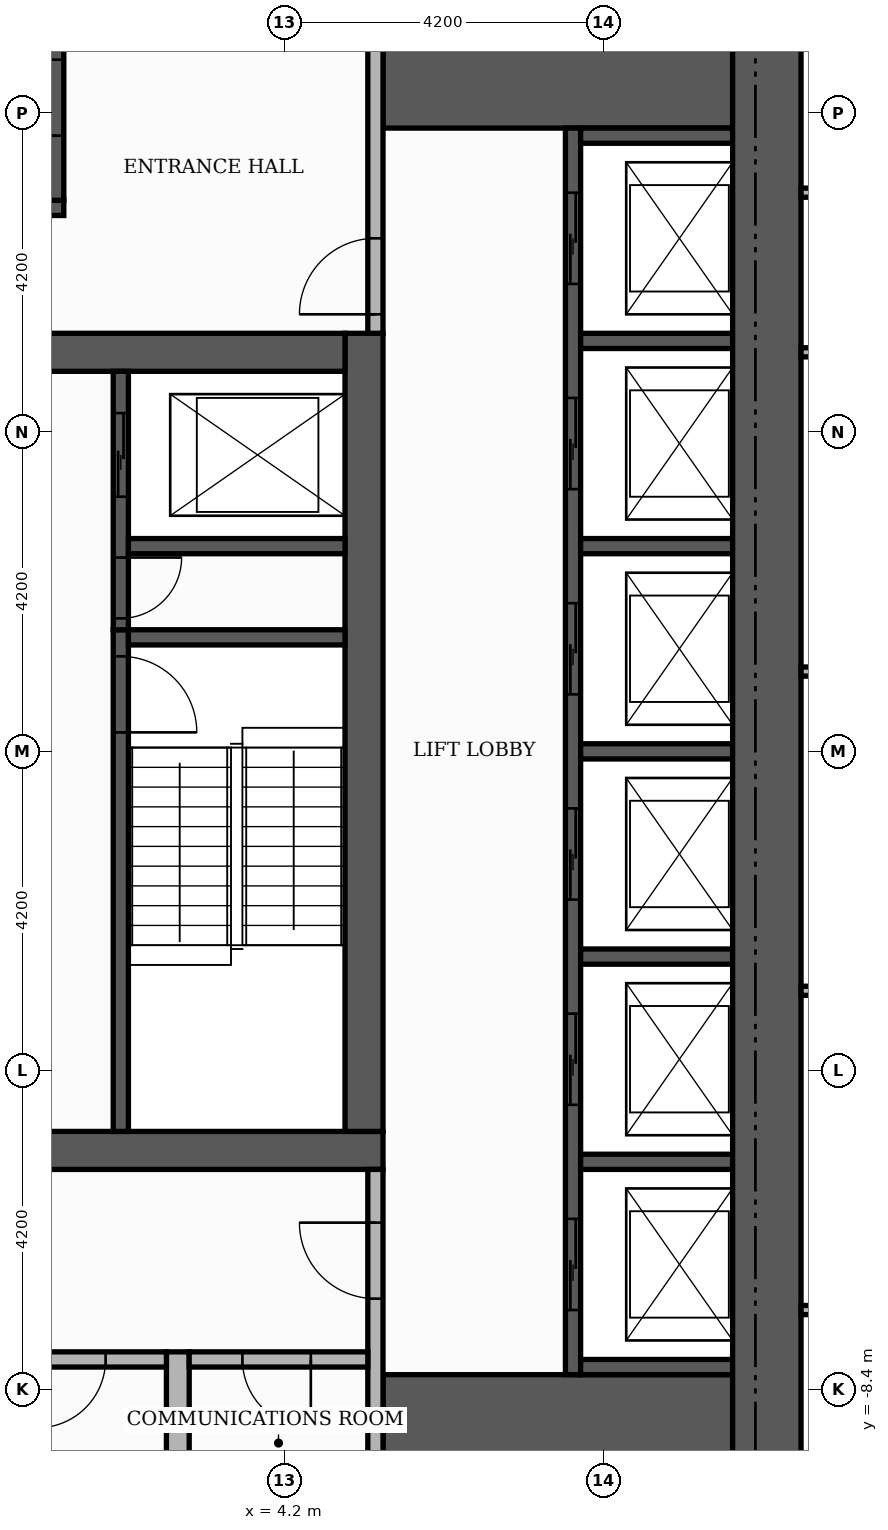
"""IFC4 building model, lengths in metres.
Left out: names, types, materials, properties, quantities, classifications, styles, units other than length and angle.
Written with IfcOpenShell. Run it as: python <this file> out.ifc"""

import sys

from ifc_helpers import new_model, si_unit, direction, frame, frame_2d, origin, place, context, subcontext, project, spatial, rectangle, extrude, element, fill, save


model = new_model("IFC4")
c1 = context("Model", 3, precision=1e-05, world=origin(), true_north=direction((0.0, 1.0)))
c2 = subcontext(c1, "Body", "Model", "MODEL_VIEW")
j1 = project(units=[si_unit("LENGTHUNIT", "METRE"), si_unit("PLANEANGLEUNIT", "RADIAN")], contexts=[c1])
p1 = place(None, origin())
s1 = spatial("IfcSite", under=j1, at=p1, CompositionType="ELEMENT")
p2 = place(p1, origin())
s2 = spatial("IfcBuilding", under=s1, at=p2, CompositionType="ELEMENT")
p3 = place(p2, frame((0.0, 0.0, 227.4)))
s3 = spatial("IfcBuildingStorey", under=s2, at=p3, CompositionType="ELEMENT", Elevation=227.4)
p4 = place(p3, frame((-5.5, -5.25, 0.0), z_axis=(0.0, 0.0, 1.0), x_axis=(1.0, 0.0, 0.0)))
e1 = element("IfcWall", 1, at=p4, inside=s3, PredefinedType="SHEAR", context=c2, shape_type="SweptSolid", body=[
    extrude(rectangle(XDim=11.0, YDim=0.5, at=frame_2d((5.5, 0.0))), origin(), (0.0, 0.0, 1.0), 3.48),
])
p5 = place(p4, frame((4.9, 0.0, 0.0)))
e2 = element("IfcOpeningElement", 2, at=p5, cuts=e1, PredefinedType="OPENING", context=c2, shape_type="SweptSolid", body=[
    extrude(rectangle(XDim=1.2, YDim=2.1, at=frame_2d((0.6, 1.05))), frame((0.0, 0.26, 0.0), z_axis=(0.0, -1.0, 0.0), x_axis=(1.0, 0.0, 0.0)), (0.0, 0.0, 1.0), 0.52),
])
p6 = place(p3, frame((5.25, -5.0, 0.0), z_axis=(0.0, 0.0, 1.0), x_axis=(0.0, 1.0, 0.0)))
e3 = element("IfcWall", 3, at=p6, inside=s3, PredefinedType="SHEAR", context=c2, shape_type="SweptSolid", body=[
    extrude(rectangle(XDim=10.5, YDim=0.5, at=frame_2d((5.25, 0.0))), origin(), (0.0, 0.0, 1.0), 3.48),
])
p7 = place(p3, frame((-5.0, 5.25, 0.0), z_axis=(0.0, 0.0, 1.0), x_axis=(1.0, 0.0, 0.0)))
e4 = element("IfcWall", 4, at=p7, inside=s3, PredefinedType="SHEAR", context=c2, shape_type="SweptSolid", body=[
    extrude(rectangle(XDim=10.0, YDim=0.5, at=frame_2d((5.0, 0.0))), origin(), (0.0, 0.0, 1.0), 3.48),
])
p8 = place(p7, frame((4.4, 0.0, 0.0)))
e5 = element("IfcOpeningElement", 5, at=p8, cuts=e4, PredefinedType="OPENING", context=c2, shape_type="SweptSolid", body=[
    extrude(rectangle(XDim=1.2, YDim=2.1, at=frame_2d((0.6, 1.05))), frame((0.0, 0.26, 0.0), z_axis=(0.0, -1.0, 0.0), x_axis=(1.0, 0.0, 0.0)), (0.0, 0.0, 1.0), 0.52),
])
for number, where, z_axis, x_axis in (
    (6, (5.5, -9.15, 0.0), (0.0, 0.0, 1.0), (1.0, 0.0, 0.0)),
    (7, (5.5, 9.15, 0.0), (0.0, 0.0, 1.0), (1.0, 0.0, 0.0)),
):
    element("IfcWall", number, at=place(p3, frame(where, z_axis=z_axis, x_axis=x_axis)), inside=s3, PredefinedType="SHEAR", context=c2, shape_type="SweptSolid", body=[
        extrude(rectangle(XDim=4.6, YDim=1.9, at=frame_2d((2.3, 0.0))), origin(), (0.0, 0.0, 1.0), 3.48),
    ])
p9 = place(p3, frame((2.05, -5.0, 0.0), z_axis=(0.0, 0.0, 1.0), x_axis=(0.0, 1.0, 0.0)))
e8 = element("IfcWall", 8, at=p9, inside=s3, PredefinedType="SHEAR", context=c2, shape_type="SweptSolid", body=[
    extrude(rectangle(XDim=6.6, YDim=0.2, at=frame_2d((3.3, 0.0))), origin(), (0.0, 0.0, 1.0), 3.48),
])
p10 = place(p9, frame((5.25, 0.0, 0.0)))
e9 = element("IfcOpeningElement", 9, at=p10, cuts=e8, PredefinedType="OPENING", context=c2, shape_type="SweptSolid", body=[
    extrude(rectangle(XDim=1.0, YDim=2.1, at=frame_2d((0.5, 1.05))), frame((0.0, 0.11, 0.0), z_axis=(0.0, -1.0, 0.0), x_axis=(1.0, 0.0, 0.0)), (0.0, 0.0, 1.0), 0.22),
])
p11 = place(p3, frame((2.15, 1.5, 0.0), z_axis=(0.0, 0.0, 1.0), x_axis=(1.0, 0.0, 0.0)))
e10 = element("IfcWall", 10, at=p11, inside=s3, PredefinedType="SHEAR", context=c2, shape_type="SweptSolid", body=[
    extrude(rectangle(XDim=2.85, YDim=0.2, at=frame_2d((1.425, 0.0))), origin(), (0.0, 0.0, 1.0), 3.48),
])
p12 = place(p3, frame((-5.5, 7.15, 0.0), z_axis=(0.0, 0.0, 1.0), x_axis=(1.0, 0.0, 0.0)))
e11 = element("IfcWall", 11, at=p12, inside=s3, PredefinedType="SHEAR", context=c2, shape_type="SweptSolid", body=[
    extrude(rectangle(XDim=6.8, YDim=0.2, at=frame_2d((3.4, 0.0))), origin(), (0.0, 0.0, 1.0), 3.48),
])
p13 = place(p3, frame((1.2, 7.25, 0.0), z_axis=(0.0, 0.0, 1.0), x_axis=(0.0, 1.0, 0.0)))
e12 = element("IfcWall", 12, at=p13, inside=s3, PredefinedType="SHEAR", context=c2, shape_type="SweptSolid", body=[
    extrude(rectangle(XDim=2.85, YDim=0.2, at=frame_2d((1.425, 0.0))), origin(), (0.0, 0.0, 1.0), 3.48),
])
p14 = place(p13, frame((0.85, 0.0, 0.0)))
e13 = element("IfcOpeningElement", 13, at=p14, cuts=e12, PredefinedType="OPENING", context=c2, shape_type="SweptSolid", body=[
    extrude(rectangle(XDim=1.0, YDim=2.1, at=frame_2d((0.5, 1.05))), frame((0.0, 0.11, 0.0), z_axis=(0.0, -1.0, 0.0), x_axis=(1.0, 0.0, 0.0)), (0.0, 0.0, 1.0), 0.22),
])
p15 = place(p3, frame((8.0, -8.2, 0.0), z_axis=(0.0, 0.0, 1.0), x_axis=(0.0, 1.0, 0.0)))
e14 = element("IfcWall", 14, at=p15, inside=s3, PredefinedType="SHEAR", context=c2, shape_type="SweptSolid", body=[
    extrude(rectangle(XDim=16.4, YDim=0.2, at=frame_2d((8.2, 0.0))), origin(), (0.0, 0.0, 1.0), 3.48),
])
p16 = place(p15, frame((0.85, 0.0, 0.0)))
e15 = element("IfcOpeningElement", 15, at=p16, cuts=e14, PredefinedType="OPENING", context=c2, shape_type="SweptSolid", body=[
    extrude(rectangle(XDim=1.2, YDim=2.1, at=frame_2d((0.6, 1.05))), frame((0.0, 0.11, 0.0), z_axis=(0.0, -1.0, 0.0), x_axis=(1.0, 0.0, 0.0)), (0.0, 0.0, 1.0), 0.22),
])
p17 = place(p15, frame((3.55, 0.0, 0.0)))
e16 = element("IfcOpeningElement", 16, at=p17, cuts=e14, PredefinedType="OPENING", context=c2, shape_type="SweptSolid", body=[
    extrude(rectangle(XDim=1.2, YDim=2.1, at=frame_2d((0.6, 1.05))), frame((0.0, 0.11, 0.0), z_axis=(0.0, -1.0, 0.0), x_axis=(1.0, 0.0, 0.0)), (0.0, 0.0, 1.0), 0.22),
])
p18 = place(p15, frame((6.25, 0.0, 0.0)))
e17 = element("IfcOpeningElement", 17, at=p18, cuts=e14, PredefinedType="OPENING", context=c2, shape_type="SweptSolid", body=[
    extrude(rectangle(XDim=1.2, YDim=2.1, at=frame_2d((0.6, 1.05))), frame((0.0, 0.11, 0.0), z_axis=(0.0, -1.0, 0.0), x_axis=(1.0, 0.0, 0.0)), (0.0, 0.0, 1.0), 0.22),
])
p19 = place(p15, frame((8.95, 0.0, 0.0)))
e18 = element("IfcOpeningElement", 18, at=p19, cuts=e14, PredefinedType="OPENING", context=c2, shape_type="SweptSolid", body=[
    extrude(rectangle(XDim=1.2, YDim=2.1, at=frame_2d((0.6, 1.05))), frame((0.0, 0.11, 0.0), z_axis=(0.0, -1.0, 0.0), x_axis=(1.0, 0.0, 0.0)), (0.0, 0.0, 1.0), 0.22),
])
p20 = place(p15, frame((11.65, 0.0, 0.0)))
e19 = element("IfcOpeningElement", 19, at=p20, cuts=e14, PredefinedType="OPENING", context=c2, shape_type="SweptSolid", body=[
    extrude(rectangle(XDim=1.2, YDim=2.1, at=frame_2d((0.6, 1.05))), frame((0.0, 0.11, 0.0), z_axis=(0.0, -1.0, 0.0), x_axis=(1.0, 0.0, 0.0)), (0.0, 0.0, 1.0), 0.22),
])
p21 = place(p15, frame((14.35, 0.0, 0.0)))
e20 = element("IfcOpeningElement", 20, at=p21, cuts=e14, PredefinedType="OPENING", context=c2, shape_type="SweptSolid", body=[
    extrude(rectangle(XDim=1.2, YDim=2.1, at=frame_2d((0.6, 1.05))), frame((0.0, 0.11, 0.0), z_axis=(0.0, -1.0, 0.0), x_axis=(1.0, 0.0, 0.0)), (0.0, 0.0, 1.0), 0.22),
])
for number, where, z_axis, x_axis in (
    (21, (8.1, -8.1, 0.0), (0.0, 0.0, 1.0), (1.0, 0.0, 0.0)),
    (22, (8.1, -5.4, 0.0), (0.0, 0.0, 1.0), (1.0, 0.0, 0.0)),
    (23, (8.1, -2.7, 0.0), (0.0, 0.0, 1.0), (1.0, 0.0, 0.0)),
    (24, (8.1, 0.0, 0.0), (0.0, 0.0, 1.0), (1.0, 0.0, 0.0)),
):
    element("IfcWall", number, at=place(p3, frame(where, z_axis=z_axis, x_axis=x_axis)), inside=s3, PredefinedType="SHEAR", context=c2, shape_type="SweptSolid", body=[
        extrude(rectangle(XDim=2.0, YDim=0.2, at=frame_2d((1.0, 0.0))), origin(), (0.0, 0.0, 1.0), 3.48),
    ])
p22 = place(p3, frame((2.05, 1.6, 0.0), z_axis=(0.0, 0.0, 1.0), x_axis=(0.0, 1.0, 0.0)))
e25 = element("IfcWall", 25, at=p22, inside=s3, PredefinedType="SHEAR", context=c2, shape_type="SweptSolid", body=[
    extrude(rectangle(XDim=3.4, YDim=0.2, at=frame_2d((1.7, 0.0))), origin(), (0.0, 0.0, 1.0), 3.48),
])
p23 = place(p22, frame((1.75, 0.0, 0.0)))
e26 = element("IfcOpeningElement", 26, at=p23, cuts=e25, PredefinedType="OPENING", context=c2, shape_type="SweptSolid", body=[
    extrude(rectangle(XDim=1.1, YDim=2.1, at=frame_2d((0.55, 1.05))), frame((0.0, 0.11, 0.0), z_axis=(0.0, -1.0, 0.0), x_axis=(1.0, 0.0, 0.0)), (0.0, 0.0, 1.0), 0.22),
])
p24 = place(p22, frame((0.15, 0.0, 0.0)))
e27 = element("IfcOpeningElement", 27, at=p24, cuts=e25, PredefinedType="OPENING", context=c2, shape_type="SweptSolid", body=[
    extrude(rectangle(XDim=0.8, YDim=2.1, at=frame_2d((0.4, 1.05))), frame((0.0, 0.11, 0.0), z_axis=(0.0, -1.0, 0.0), x_axis=(1.0, 0.0, 0.0)), (0.0, 0.0, 1.0), 0.22),
])
p25 = place(p3, frame((2.15, 2.7, 0.0), z_axis=(0.0, 0.0, 1.0), x_axis=(1.0, 0.0, 0.0)))
e28 = element("IfcWall", 28, at=p25, inside=s3, PredefinedType="SHEAR", context=c2, shape_type="SweptSolid", body=[
    extrude(rectangle(XDim=2.85, YDim=0.2, at=frame_2d((1.425, 0.0))), origin(), (0.0, 0.0, 1.0), 3.48),
])
for number, where, z_axis, x_axis in (
    (29, (8.1, 2.7, 0.0), (0.0, 0.0, 1.0), (1.0, 0.0, 0.0)),
    (30, (8.1, 5.4, 0.0), (0.0, 0.0, 1.0), (1.0, 0.0, 0.0)),
    (31, (8.1, 8.1, 0.0), (0.0, 0.0, 1.0), (1.0, 0.0, 0.0)),
):
    element("IfcWall", number, at=place(p3, frame(where, z_axis=z_axis, x_axis=x_axis)), inside=s3, PredefinedType="SHEAR", context=c2, shape_type="SweptSolid", body=[
        extrude(rectangle(XDim=2.0, YDim=0.2, at=frame_2d((1.0, 0.0))), origin(), (0.0, 0.0, 1.0), 3.48),
    ])
p26 = place(p3, frame((10.55, -10.1, 0.0), z_axis=(0.0, 0.0, 1.0), x_axis=(0.0, 1.0, 0.0)))
e32 = element("IfcWall", 32, at=p26, inside=s3, PredefinedType="SHEAR", context=c2, shape_type="SweptSolid", body=[
    extrude(rectangle(XDim=20.2, YDim=0.9, at=frame_2d((10.1, 0.0))), origin(), (0.0, 0.0, 1.0), 3.48),
])
p27 = place(p3, frame((2.8, -10.1, 0.0), z_axis=(0.0, 0.0, 1.0), x_axis=(0.0, 1.0, 0.0)))
e33 = element("IfcWall", 33, at=p27, inside=s3, PredefinedType="PARTITIONING", context=c2, shape_type="SweptSolid", body=[
    extrude(rectangle(XDim=2.2, YDim=0.3, at=frame_2d((1.1, 0.0))), origin(), (0.0, 0.0, 1.0), 3.48),
])
p28 = place(p3, frame((5.4, -10.1, 0.0), z_axis=(0.0, 0.0, 1.0), x_axis=(0.0, 1.0, 0.0)))
e34 = element("IfcWall", 34, at=p28, inside=s3, PredefinedType="PARTITIONING", context=c2, shape_type="SweptSolid", body=[
    extrude(rectangle(XDim=4.6, YDim=0.2, at=frame_2d((2.3, 0.0))), origin(), (0.0, 0.0, 1.0), 3.48),
])
p29 = place(p28, frame((2.9, 0.0, 0.0)))
e35 = element("IfcOpeningElement", 35, at=p29, cuts=e34, PredefinedType="OPENING", context=c2, shape_type="SweptSolid", body=[
    extrude(rectangle(XDim=1.0, YDim=2.1, at=frame_2d((0.5, 1.05))), frame((0.0, 0.11, 0.0), z_axis=(0.0, -1.0, 0.0), x_axis=(1.0, 0.0, 0.0)), (0.0, 0.0, 1.0), 0.22),
])
p30 = place(p3, frame((0.1, -8.0, 0.0), z_axis=(0.0, 0.0, 1.0), x_axis=(1.0, 0.0, 0.0)))
e36 = element("IfcWall", 36, at=p30, inside=s3, PredefinedType="PARTITIONING", context=c2, shape_type="SweptSolid", body=[
    extrude(rectangle(XDim=2.55, YDim=0.2, at=frame_2d((1.275, 0.0))), origin(), (0.0, 0.0, 1.0), 3.48),
])
p31 = place(p30, frame((0.85, 0.0, 0.0)))
e37 = element("IfcOpeningElement", 37, at=p31, cuts=e36, PredefinedType="OPENING", context=c2, shape_type="SweptSolid", body=[
    extrude(rectangle(XDim=0.9, YDim=2.1, at=frame_2d((0.45, 1.05))), frame((0.0, 0.11, 0.0), z_axis=(0.0, -1.0, 0.0), x_axis=(1.0, 0.0, 0.0)), (0.0, 0.0, 1.0), 0.22),
])
p32 = place(p3, frame((2.95, -8.0, 0.0), z_axis=(0.0, 0.0, 1.0), x_axis=(1.0, 0.0, 0.0)))
e38 = element("IfcWall", 38, at=p32, inside=s3, PredefinedType="PARTITIONING", context=c2, shape_type="SweptSolid", body=[
    extrude(rectangle(XDim=2.35, YDim=0.2, at=frame_2d((1.175, 0.0))), origin(), (0.0, 0.0, 1.0), 3.48),
])
p33 = place(p32, frame((0.7, 0.0, 0.0)))
e39 = element("IfcOpeningElement", 39, at=p33, cuts=e38, PredefinedType="OPENING", context=c2, shape_type="SweptSolid", body=[
    extrude(rectangle(XDim=0.9, YDim=2.1, at=frame_2d((0.45, 1.05))), frame((0.0, 0.11, 0.0), z_axis=(0.0, -1.0, 0.0), x_axis=(1.0, 0.0, 0.0)), (0.0, 0.0, 1.0), 0.22),
])
p34 = place(p3, frame((5.4, 5.5, 0.0), z_axis=(0.0, 0.0, 1.0), x_axis=(0.0, 1.0, 0.0)))
e40 = element("IfcWall", 40, at=p34, inside=s3, PredefinedType="PARTITIONING", context=c2, shape_type="SweptSolid", body=[
    extrude(rectangle(XDim=4.6, YDim=0.2, at=frame_2d((2.3, 0.0))), origin(), (0.0, 0.0, 1.0), 3.48),
])
p35 = place(p34, frame((0.25, 0.0, 0.0)))
e41 = element("IfcOpeningElement", 41, at=p35, cuts=e40, PredefinedType="OPENING", context=c2, shape_type="SweptSolid", body=[
    extrude(rectangle(XDim=1.0, YDim=2.1, at=frame_2d((0.5, 1.05))), frame((0.0, 0.11, 0.0), z_axis=(0.0, -1.0, 0.0), x_axis=(1.0, 0.0, 0.0)), (0.0, 0.0, 1.0), 0.22),
])
p36 = place(p3, frame((11.0, -7.35, 0.0), z_axis=(0.0, 0.0, 1.0), x_axis=(1.0, 0.0, 0.0)))
e42 = element("IfcWall", 42, at=p36, inside=s3, PredefinedType="PARTITIONING", context=c2, shape_type="SweptSolid", body=[
    extrude(rectangle(XDim=7.92, YDim=0.12, at=frame_2d((3.96, 0.0))), origin(), (0.0, 0.0, 1.0), 3.48),
])
p37 = place(p36, frame((3.51, 0.0, 0.0)))
e43 = element("IfcOpeningElement", 43, at=p37, cuts=e42, PredefinedType="OPENING", context=c2, shape_type="SweptSolid", body=[
    extrude(rectangle(XDim=0.9, YDim=2.1, at=frame_2d((0.45, 1.05))), frame((0.0, 0.07, 0.0), z_axis=(0.0, -1.0, 0.0), x_axis=(1.0, 0.0, 0.0)), (0.0, 0.0, 1.0), 0.14),
])
for number, where, z_axis, x_axis in (
    (44, (11.0, -3.15, 0.0), (0.0, 0.0, 1.0), (1.0, 0.0, 0.0)),
    (45, (11.0, 1.05, 0.0), (0.0, 0.0, 1.0), (1.0, 0.0, 0.0)),
    (46, (11.0, 5.25, 0.0), (0.0, 0.0, 1.0), (1.0, 0.0, 0.0)),
    (47, (11.0, 7.35, 0.0), (0.0, 0.0, 1.0), (1.0, 0.0, 0.0)),
):
    element("IfcWall", number, at=place(p3, frame(where, z_axis=z_axis, x_axis=x_axis)), inside=s3, PredefinedType="PARTITIONING", context=c2, shape_type="SweptSolid", body=[
        extrude(rectangle(XDim=7.92, YDim=0.12, at=frame_2d((3.96, 0.0))), origin(), (0.0, 0.0, 1.0), 3.48),
    ])
p38 = place(p16, origin())
e48 = element("IfcDoor", 48, at=p38, inside=s3, OperationType="SLIDING_TO_LEFT", PredefinedType="DOOR", context=c2, shape_type="SweptSolid", body=[
    extrude(rectangle(XDim=1.2, YDim=2.1, at=frame_2d((0.6, 1.05))), frame((0.0, 0.025, 0.0), z_axis=(0.0, -1.0, 0.0), x_axis=(1.0, 0.0, 0.0)), (0.0, 0.0, 1.0), 0.05),
])
fill(e15, e48)
p39 = place(p17, origin())
e49 = element("IfcDoor", 49, at=p39, inside=s3, OperationType="SLIDING_TO_LEFT", PredefinedType="DOOR", context=c2, shape_type="SweptSolid", body=[
    extrude(rectangle(XDim=1.2, YDim=2.1, at=frame_2d((0.6, 1.05))), frame((0.0, 0.025, 0.0), z_axis=(0.0, -1.0, 0.0), x_axis=(1.0, 0.0, 0.0)), (0.0, 0.0, 1.0), 0.05),
])
fill(e16, e49)
p40 = place(p18, origin())
e50 = element("IfcDoor", 50, at=p40, inside=s3, OperationType="SLIDING_TO_LEFT", PredefinedType="DOOR", context=c2, shape_type="SweptSolid", body=[
    extrude(rectangle(XDim=1.2, YDim=2.1, at=frame_2d((0.6, 1.05))), frame((0.0, 0.025, 0.0), z_axis=(0.0, -1.0, 0.0), x_axis=(1.0, 0.0, 0.0)), (0.0, 0.0, 1.0), 0.05),
])
fill(e17, e50)
p41 = place(p19, origin())
e51 = element("IfcDoor", 51, at=p41, inside=s3, OperationType="SLIDING_TO_LEFT", PredefinedType="DOOR", context=c2, shape_type="SweptSolid", body=[
    extrude(rectangle(XDim=1.2, YDim=2.1, at=frame_2d((0.6, 1.05))), frame((0.0, 0.025, 0.0), z_axis=(0.0, -1.0, 0.0), x_axis=(1.0, 0.0, 0.0)), (0.0, 0.0, 1.0), 0.05),
])
fill(e18, e51)
p42 = place(p20, origin())
e52 = element("IfcDoor", 52, at=p42, inside=s3, OperationType="SLIDING_TO_LEFT", PredefinedType="DOOR", context=c2, shape_type="SweptSolid", body=[
    extrude(rectangle(XDim=1.2, YDim=2.1, at=frame_2d((0.6, 1.05))), frame((0.0, 0.025, 0.0), z_axis=(0.0, -1.0, 0.0), x_axis=(1.0, 0.0, 0.0)), (0.0, 0.0, 1.0), 0.05),
])
fill(e19, e52)
p43 = place(p21, origin())
e53 = element("IfcDoor", 53, at=p43, inside=s3, OperationType="SLIDING_TO_LEFT", PredefinedType="DOOR", context=c2, shape_type="SweptSolid", body=[
    extrude(rectangle(XDim=1.2, YDim=2.1, at=frame_2d((0.6, 1.05))), frame((0.0, 0.025, 0.0), z_axis=(0.0, -1.0, 0.0), x_axis=(1.0, 0.0, 0.0)), (0.0, 0.0, 1.0), 0.05),
])
fill(e20, e53)
p44 = place(p23, origin())
e54 = element("IfcDoor", 54, at=p44, inside=s3, OperationType="SLIDING_TO_LEFT", PredefinedType="DOOR", context=c2, shape_type="SweptSolid", body=[
    extrude(rectangle(XDim=1.1, YDim=2.1, at=frame_2d((0.55, 1.05))), frame((0.0, 0.025, 0.0), z_axis=(0.0, -1.0, 0.0), x_axis=(1.0, 0.0, 0.0)), (0.0, 0.0, 1.0), 0.05),
])
fill(e26, e54)
p45 = place(p10, frame((1.0, 0.0, 0.0), z_axis=(0.0, 0.0, 1.0), x_axis=(-1.0, 0.0, 0.0)))
e55 = element("IfcDoor", 55, at=p45, inside=s3, OperationType="SINGLE_SWING_LEFT", PredefinedType="DOOR", context=c2, shape_type="SweptSolid", body=[
    extrude(rectangle(XDim=1.0, YDim=2.1, at=frame_2d((0.5, 1.05))), frame((0.0, 0.025, 0.0), z_axis=(0.0, -1.0, 0.0), x_axis=(1.0, 0.0, 0.0)), (0.0, 0.0, 1.0), 0.05),
])
fill(e9, e55)
p46 = place(p24, frame((0.8, 0.0, 0.0), z_axis=(0.0, 0.0, 1.0), x_axis=(-1.0, 0.0, 0.0)))
e56 = element("IfcDoor", 56, at=p46, inside=s3, OperationType="SINGLE_SWING_RIGHT", PredefinedType="DOOR", context=c2, shape_type="SweptSolid", body=[
    extrude(rectangle(XDim=0.8, YDim=2.1, at=frame_2d((0.4, 1.05))), frame((0.0, 0.025, 0.0), z_axis=(0.0, -1.0, 0.0), x_axis=(1.0, 0.0, 0.0)), (0.0, 0.0, 1.0), 0.05),
])
fill(e27, e56)
p47 = place(p14, origin())
e57 = element("IfcDoor", 57, at=p47, inside=s3, OperationType="SINGLE_SWING_LEFT", PredefinedType="DOOR", context=c2, shape_type="SweptSolid", body=[
    extrude(rectangle(XDim=1.0, YDim=2.1, at=frame_2d((0.5, 1.05))), frame((0.0, 0.025, 0.0), z_axis=(0.0, -1.0, 0.0), x_axis=(1.0, 0.0, 0.0)), (0.0, 0.0, 1.0), 0.05),
])
fill(e13, e57)
p48 = place(p35, origin())
e58 = element("IfcDoor", 58, at=p48, inside=s3, OperationType="SINGLE_SWING_LEFT", PredefinedType="DOOR", context=c2, shape_type="SweptSolid", body=[
    extrude(rectangle(XDim=1.0, YDim=2.1, at=frame_2d((0.5, 1.05))), frame((0.0, 0.025, 0.0), z_axis=(0.0, -1.0, 0.0), x_axis=(1.0, 0.0, 0.0)), (0.0, 0.0, 1.0), 0.05),
])
fill(e41, e58)
p49 = place(p29, origin())
e59 = element("IfcDoor", 59, at=p49, inside=s3, OperationType="SINGLE_SWING_RIGHT", PredefinedType="DOOR", context=c2, shape_type="SweptSolid", body=[
    extrude(rectangle(XDim=1.0, YDim=2.1, at=frame_2d((0.5, 1.05))), frame((0.0, 0.025, 0.0), z_axis=(0.0, -1.0, 0.0), x_axis=(1.0, 0.0, 0.0)), (0.0, 0.0, 1.0), 0.05),
])
fill(e35, e59)
p50 = place(p31, frame((0.9, 0.0, 0.0), z_axis=(0.0, 0.0, 1.0), x_axis=(-1.0, 0.0, 0.0)))
e60 = element("IfcDoor", 60, at=p50, inside=s3, OperationType="SINGLE_SWING_LEFT", PredefinedType="DOOR", context=c2, shape_type="SweptSolid", body=[
    extrude(rectangle(XDim=0.9, YDim=2.1, at=frame_2d((0.45, 1.05))), frame((0.0, 0.025, 0.0), z_axis=(0.0, -1.0, 0.0), x_axis=(1.0, 0.0, 0.0)), (0.0, 0.0, 1.0), 0.05),
])
fill(e37, e60)
p51 = place(p33, frame((0.9, 0.0, 0.0), z_axis=(0.0, 0.0, 1.0), x_axis=(-1.0, 0.0, 0.0)))
e61 = element("IfcDoor", 61, at=p51, inside=s3, OperationType="SINGLE_SWING_RIGHT", PredefinedType="DOOR", context=c2, shape_type="SweptSolid", body=[
    extrude(rectangle(XDim=0.9, YDim=2.1, at=frame_2d((0.45, 1.05))), frame((0.0, 0.025, 0.0), z_axis=(0.0, -1.0, 0.0), x_axis=(1.0, 0.0, 0.0)), (0.0, 0.0, 1.0), 0.05),
])
fill(e39, e61)
save(model, sys.argv[1])
